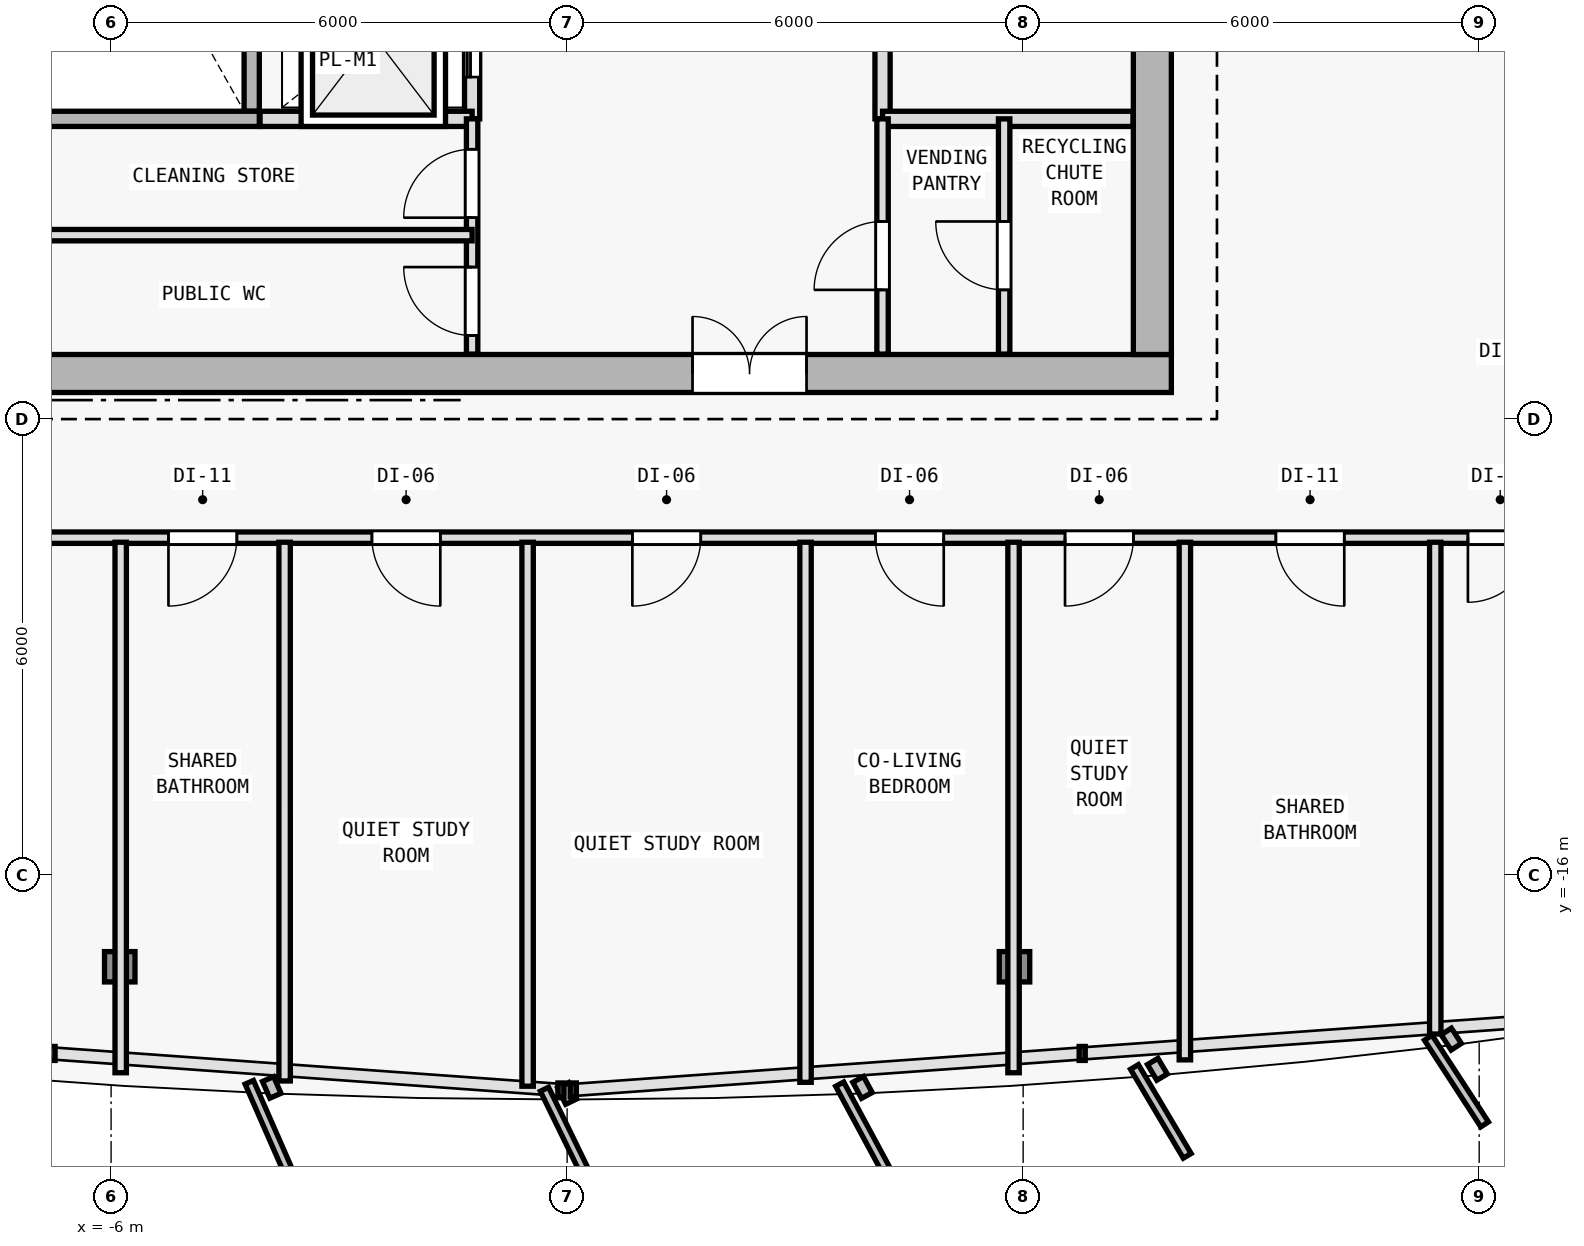
"""IFC4 building model, lengths in metres.
Left out: names, types, materials, properties, quantities, classifications, styles, units other than length and angle.
Written with IfcOpenShell. Run it as: python <this file> out.ifc"""

import sys

from ifc_helpers import new_model, si_unit, direction, frame, frame_2d, origin, origin_2d, place, context, subcontext, project, spatial, rectangle, i_section, extrude, element, fill, save


model = new_model("IFC4")
c1 = context("Model", 3, precision=1e-05, world=origin(), true_north=direction((0.0, 1.0)))
c2 = subcontext(c1, "Body", "Model", "MODEL_VIEW")
j1 = project(units=[si_unit("LENGTHUNIT", "METRE"), si_unit("PLANEANGLEUNIT", "RADIAN")], contexts=[c1])
p1 = place(None, origin())
s1 = spatial("IfcSite", under=j1, at=p1, CompositionType="ELEMENT")
p2 = place(p1, origin())
s2 = spatial("IfcBuilding", under=s1, at=p2, CompositionType="ELEMENT")
p3 = place(p2, frame((0.0, 0.0, 167.4)))
s3 = spatial("IfcBuildingStorey", under=s2, at=p3, CompositionType="ELEMENT", Elevation=167.4)
for number, where, z_axis, x_axis in (
    (1, (7.7, -9.4, 0.0), (0.0, 0.0, 1.0), (1.0, 0.0, 0.0)),
    (2, (0.0, -9.4, 0.0), (0.0, 0.0, 1.0), (1.0, 0.0, 0.0)),
):
    element("IfcColumn", number, at=place(p3, frame(where, z_axis=z_axis, x_axis=x_axis)), inside=s3, PredefinedType="COLUMN", context=c2, shape_type="SweptSolid", body=[
        extrude(i_section(OverallWidth=0.404, OverallDepth=0.407, WebThickness=0.017, FlangeThickness=0.028, FilletRadius=0.015, at=origin_2d()), origin(), (0.0, 0.0, 1.0), 3.6),
    ])
for number, where, z_axis, x_axis in (
    (3, (-5.886, -17.205, 0.006), (0.007, 0.035, 0.999), (-0.982, 0.191, 0.0)),
    (4, (5.886, -17.205, 0.006), (-0.007, 0.035, 0.999), (-0.982, -0.191, 0.0)),
):
    element("IfcColumn", number, at=place(p3, frame(where, z_axis=z_axis, x_axis=x_axis)), inside=s3, PredefinedType="COLUMN", context=c2, shape_type="SweptSolid", body=[
        extrude(i_section(OverallWidth=0.401, OverallDepth=0.399, WebThickness=0.016, FlangeThickness=0.025, FilletRadius=0.015, at=origin_2d()), origin(), (0.0, 0.0, 1.0), 3.591),
    ])
p4 = place(p3, frame((-7.95, -9.4, 0.0), z_axis=(0.0, 0.0, 1.0), x_axis=(1.0, 0.0, 0.0)))
e5 = element("IfcWall", 5, at=p4, inside=s3, PredefinedType="SHEAR", context=c2, shape_type="SweptSolid", body=[
    extrude(rectangle(XDim=15.9, YDim=0.5, at=frame_2d((7.95, 0.0))), origin(), (0.0, 0.0, 1.0), 3.35),
])
p5 = place(p4, frame((9.6, 0.0, 0.0)))
e6 = element("IfcOpeningElement", 6, at=p5, cuts=e5, PredefinedType="OPENING", context=c2, shape_type="SweptSolid", body=[
    extrude(rectangle(XDim=1.5, YDim=2.2, at=frame_2d((0.75, 1.1))), frame((0.0, 0.26, 0.0), z_axis=(0.0, -1.0, 0.0), x_axis=(1.0, 0.0, 0.0)), (0.0, 0.0, 1.0), 0.52),
])
p6 = place(p3, frame((7.7, 9.95, 0.0), z_axis=(0.0, 0.0, 1.0), x_axis=(0.0, -1.0, 0.0)))
e7 = element("IfcWall", 7, at=p6, inside=s3, PredefinedType="SHEAR", context=c2, shape_type="SweptSolid", body=[
    extrude(rectangle(XDim=19.1, YDim=0.5, at=frame_2d((9.55, 0.0))), origin(), (0.0, 0.0, 1.0), 3.35),
])
p7 = place(p3, frame((-4.15, -5.95, 0.0), z_axis=(0.0, 0.0, 1.0), x_axis=(0.0, 1.0, 0.0)))
e8 = element("IfcWall", 8, at=p7, inside=s3, PredefinedType="SOLIDWALL", context=c2, shape_type="SweptSolid", body=[
    extrude(rectangle(XDim=7.2, YDim=0.2, at=frame_2d((3.6, 0.0))), origin(), (0.0, 0.0, 1.0), 3.35),
])
p8 = place(p3, frame((4.15, -6.05, 0.0), z_axis=(0.0, 0.0, 1.0), x_axis=(0.0, 1.0, 0.0)))
e9 = element("IfcWall", 9, at=p8, inside=s3, PredefinedType="SOLIDWALL", context=c2, shape_type="SweptSolid", body=[
    extrude(rectangle(XDim=8.7, YDim=0.2, at=frame_2d((4.35, 0.0))), origin(), (0.0, 0.0, 1.0), 3.35),
])
p9 = place(p8, frame((3.6, 0.0, 0.0)))
e10 = element("IfcOpeningElement", 10, at=p9, cuts=e9, PredefinedType="OPENING", context=c2, shape_type="SweptSolid", body=[
    extrude(rectangle(XDim=0.95, YDim=2.1, at=frame_2d((0.475, 1.05))), frame((0.0, 0.11, 0.0), z_axis=(0.0, -1.0, 0.0), x_axis=(1.0, 0.0, 0.0)), (0.0, 0.0, 1.0), 0.22),
])
p10 = place(p3, frame((-1.25, -6.05, 0.0), z_axis=(0.0, 0.0, 1.0), x_axis=(0.0, 1.0, 0.0)))
e11 = element("IfcWall", 11, at=p10, inside=s3, PredefinedType="SOLIDWALL", context=c2, shape_type="SweptSolid", body=[
    extrude(rectangle(XDim=8.7, YDim=0.2, at=frame_2d((4.35, 0.0))), origin(), (0.0, 0.0, 1.0), 3.35),
])
p11 = place(p10, frame((0.55, 0.0, 0.0)))
e12 = element("IfcOpeningElement", 12, at=p11, cuts=e11, PredefinedType="OPENING", context=c2, shape_type="SweptSolid", body=[
    extrude(rectangle(XDim=1.1, YDim=2.15, at=frame_2d((0.55, 1.075))), frame((0.0, 0.11, 0.0), z_axis=(0.0, -1.0, 0.0), x_axis=(1.0, 0.0, 0.0)), (0.0, 0.0, 1.0), 0.22),
])
p12 = place(p10, frame((2.65, 0.0, 0.0)))
e13 = element("IfcOpeningElement", 13, at=p12, cuts=e11, PredefinedType="OPENING", context=c2, shape_type="SweptSolid", body=[
    extrude(rectangle(XDim=1.1, YDim=2.15, at=frame_2d((0.55, 1.075))), frame((0.0, 0.11, 0.0), z_axis=(0.0, -1.0, 0.0), x_axis=(1.0, 0.0, 0.0)), (0.0, 0.0, 1.0), 0.22),
])
p13 = place(p10, frame((4.75, 0.0, 0.0)))
e14 = element("IfcOpeningElement", 14, at=p13, cuts=e11, PredefinedType="OPENING", context=c2, shape_type="SweptSolid", body=[
    extrude(rectangle(XDim=1.1, YDim=2.15, at=frame_2d((0.55, 1.075))), frame((0.0, 0.11, 0.0), z_axis=(0.0, -1.0, 0.0), x_axis=(1.0, 0.0, 0.0)), (0.0, 0.0, 1.0), 0.22),
])
p14 = place(p10, frame((6.85, 0.0, 0.0)))
e15 = element("IfcOpeningElement", 15, at=p14, cuts=e11, PredefinedType="OPENING", context=c2, shape_type="SweptSolid", body=[
    extrude(rectangle(XDim=1.1, YDim=2.15, at=frame_2d((0.55, 1.075))), frame((0.0, 0.11, 0.0), z_axis=(0.0, -1.0, 0.0), x_axis=(1.0, 0.0, 0.0)), (0.0, 0.0, 1.0), 0.22),
])
p15 = place(p3, frame((-7.45, -6.05, 0.0), z_axis=(0.0, 0.0, 1.0), x_axis=(1.0, 0.0, 0.0)))
e16 = element("IfcWall", 16, at=p15, inside=s3, PredefinedType="SOLIDWALL", context=c2, shape_type="SweptSolid", body=[
    extrude(rectangle(XDim=3.4, YDim=0.2, at=frame_2d((1.7, 0.0))), origin(), (0.0, 0.0, 1.0), 3.35),
])
p16 = place(p3, frame((-4.04, -6.05, 0.0), z_axis=(0.0, 0.0, 1.0), x_axis=(1.0, 0.0, 0.0)))
e17 = element("IfcWall", 17, at=p16, inside=s3, PredefinedType="SOLIDWALL", context=c2, shape_type="SweptSolid", body=[
    extrude(rectangle(XDim=2.79, YDim=0.2, at=frame_2d((1.395, 0.0))), origin(), (0.0, 0.0, 1.0), 3.35),
])
p17 = place(p3, frame((4.15, -6.05, 0.0), z_axis=(0.0, 0.0, 1.0), x_axis=(1.0, 0.0, 0.0)))
e18 = element("IfcWall", 18, at=p17, inside=s3, PredefinedType="SOLIDWALL", context=c2, shape_type="SweptSolid", body=[
    extrude(rectangle(XDim=3.295, YDim=0.2, at=frame_2d((1.647, 0.0))), origin(), (0.0, 0.0, 1.0), 3.35),
])
p18 = place(p3, frame((-1.25, -9.145, 0.0), z_axis=(0.0, 0.0, 1.0), x_axis=(0.0, 1.0, 0.0)))
e19 = element("IfcWall", 19, at=p18, inside=s3, PredefinedType="PARTITIONING", context=c2, shape_type="SweptSolid", body=[
    extrude(rectangle(XDim=3.095, YDim=0.15, at=frame_2d((1.547, 0.0))), origin(), (0.0, 0.0, 1.0), 3.35),
])
p19 = place(p18, frame((1.795, 0.0, 0.0)))
e20 = element("IfcOpeningElement", 20, at=p19, cuts=e19, PredefinedType="OPENING", context=c2, shape_type="SweptSolid", body=[
    extrude(rectangle(XDim=0.9, YDim=2.1, at=frame_2d((0.45, 1.05))), frame((0.0, 0.085, 0.0), z_axis=(0.0, -1.0, 0.0), x_axis=(1.0, 0.0, 0.0)), (0.0, 0.0, 1.0), 0.17),
])
p20 = place(p18, frame((0.245, 0.0, 0.0)))
e21 = element("IfcOpeningElement", 21, at=p20, cuts=e19, PredefinedType="OPENING", context=c2, shape_type="SweptSolid", body=[
    extrude(rectangle(XDim=0.9, YDim=2.1, at=frame_2d((0.45, 1.05))), frame((0.0, 0.085, 0.0), z_axis=(0.0, -1.0, 0.0), x_axis=(1.0, 0.0, 0.0)), (0.0, 0.0, 1.0), 0.17),
])
p21 = place(p3, frame((4.15, -9.145, 0.0), z_axis=(0.0, 0.0, 1.0), x_axis=(0.0, 1.0, 0.0)))
e22 = element("IfcWall", 22, at=p21, inside=s3, PredefinedType="PARTITIONING", context=c2, shape_type="SweptSolid", body=[
    extrude(rectangle(XDim=3.095, YDim=0.15, at=frame_2d((1.547, 0.0))), origin(), (0.0, 0.0, 1.0), 3.35),
])
p22 = place(p21, frame((0.845, 0.0, 0.0)))
e23 = element("IfcOpeningElement", 23, at=p22, cuts=e22, PredefinedType="OPENING", context=c2, shape_type="SweptSolid", body=[
    extrude(rectangle(XDim=0.9, YDim=2.1, at=frame_2d((0.45, 1.05))), frame((0.0, 0.085, 0.0), z_axis=(0.0, -1.0, 0.0), x_axis=(1.0, 0.0, 0.0)), (0.0, 0.0, 1.0), 0.17),
])
p23 = place(p3, frame((-7.445, -7.58, 0.0), z_axis=(0.0, 0.0, 1.0), x_axis=(1.0, 0.0, 0.0)))
e24 = element("IfcWall", 24, at=p23, inside=s3, PredefinedType="PARTITIONING", context=c2, shape_type="SweptSolid", body=[
    extrude(rectangle(XDim=6.195, YDim=0.15, at=frame_2d((3.098, 0.0))), origin(), (0.0, 0.0, 1.0), 3.35),
])
p24 = place(p3, frame((5.75, -9.145, 0.0), z_axis=(0.0, 0.0, 1.0), x_axis=(0.0, 1.0, 0.0)))
e25 = element("IfcWall", 25, at=p24, inside=s3, PredefinedType="PARTITIONING", context=c2, shape_type="SweptSolid", body=[
    extrude(rectangle(XDim=3.095, YDim=0.15, at=frame_2d((1.547, 0.0))), origin(), (0.0, 0.0, 1.0), 3.35),
])
p25 = place(p24, frame((0.845, 0.0, 0.0)))
e26 = element("IfcOpeningElement", 26, at=p25, cuts=e25, PredefinedType="OPENING", context=c2, shape_type="SweptSolid", body=[
    extrude(rectangle(XDim=0.9, YDim=2.1, at=frame_2d((0.45, 1.05))), frame((0.0, 0.085, 0.0), z_axis=(0.0, -1.0, 0.0), x_axis=(1.0, 0.0, 0.0)), (0.0, 0.0, 1.0), 0.17),
])
p26 = place(p3, frame((13.18, -11.56, 0.0), z_axis=(0.0, 0.0, 1.0), x_axis=(-1.0, 0.0, 0.0)))
e27 = element("IfcWall", 27, at=p26, inside=s3, PredefinedType="PARTITIONING", context=c2, shape_type="SweptSolid", body=[
    extrude(rectangle(XDim=23.04, YDim=0.15, at=frame_2d((11.52, 0.0))), origin(), (0.0, 0.0, 1.0), 2.775),
])
p27 = place(p26, frame((20.508, 0.0, 0.0)))
e28 = element("IfcOpeningElement", 28, at=p27, cuts=e27, PredefinedType="OPENING", context=c2, shape_type="SweptSolid", body=[
    extrude(rectangle(XDim=0.9, YDim=2.1, at=frame_2d((0.45, 1.05))), frame((0.0, 0.085, 0.0), z_axis=(0.0, -1.0, 0.0), x_axis=(1.0, 0.0, 0.0)), (0.0, 0.0, 1.0), 0.17),
])
p28 = place(p26, frame((17.525, 0.0, 0.0)))
e29 = element("IfcOpeningElement", 29, at=p28, cuts=e27, PredefinedType="OPENING", context=c2, shape_type="SweptSolid", body=[
    extrude(rectangle(XDim=0.9, YDim=2.1, at=frame_2d((0.45, 1.05))), frame((0.0, 0.085, 0.0), z_axis=(0.0, -1.0, 0.0), x_axis=(1.0, 0.0, 0.0)), (0.0, 0.0, 1.0), 0.17),
])
p29 = place(p26, frame((14.848, 0.0, 0.0)))
e30 = element("IfcOpeningElement", 30, at=p29, cuts=e27, PredefinedType="OPENING", context=c2, shape_type="SweptSolid", body=[
    extrude(rectangle(XDim=0.9, YDim=2.1, at=frame_2d((0.45, 1.05))), frame((0.0, 0.085, 0.0), z_axis=(0.0, -1.0, 0.0), x_axis=(1.0, 0.0, 0.0)), (0.0, 0.0, 1.0), 0.17),
])
p30 = place(p26, frame((11.422, 0.0, 0.0)))
e31 = element("IfcOpeningElement", 31, at=p30, cuts=e27, PredefinedType="OPENING", context=c2, shape_type="SweptSolid", body=[
    extrude(rectangle(XDim=0.9, YDim=2.1, at=frame_2d((0.45, 1.05))), frame((0.0, 0.085, 0.0), z_axis=(0.0, -1.0, 0.0), x_axis=(1.0, 0.0, 0.0)), (0.0, 0.0, 1.0), 0.17),
])
p31 = place(p26, frame((8.225, 0.0, 0.0)))
e32 = element("IfcOpeningElement", 32, at=p31, cuts=e27, PredefinedType="OPENING", context=c2, shape_type="SweptSolid", body=[
    extrude(rectangle(XDim=0.9, YDim=2.1, at=frame_2d((0.45, 1.05))), frame((0.0, 0.085, 0.0), z_axis=(0.0, -1.0, 0.0), x_axis=(1.0, 0.0, 0.0)), (0.0, 0.0, 1.0), 0.17),
])
p32 = place(p26, frame((5.729, 0.0, 0.0)))
e33 = element("IfcOpeningElement", 33, at=p32, cuts=e27, PredefinedType="OPENING", context=c2, shape_type="SweptSolid", body=[
    extrude(rectangle(XDim=0.9, YDim=2.1, at=frame_2d((0.45, 1.05))), frame((0.0, 0.085, 0.0), z_axis=(0.0, -1.0, 0.0), x_axis=(1.0, 0.0, 0.0)), (0.0, 0.0, 1.0), 0.17),
])
p33 = place(p26, frame((2.955, 0.0, 0.0)))
e34 = element("IfcOpeningElement", 34, at=p33, cuts=e27, PredefinedType="OPENING", context=c2, shape_type="SweptSolid", body=[
    extrude(rectangle(XDim=0.9, YDim=2.1, at=frame_2d((0.45, 1.05))), frame((0.0, 0.085, 0.0), z_axis=(0.0, -1.0, 0.0), x_axis=(1.0, 0.0, 0.0)), (0.0, 0.0, 1.0), 0.17),
])
p34 = place(p26, frame((0.478, 0.0, 0.0)))
e35 = element("IfcOpeningElement", 35, at=p34, cuts=e27, PredefinedType="OPENING", context=c2, shape_type="SweptSolid", body=[
    extrude(rectangle(XDim=0.85, YDim=2.1, at=frame_2d((0.425, 1.05))), frame((0.0, 0.085, 0.0), z_axis=(0.0, -1.0, 0.0), x_axis=(1.0, 0.0, 0.0)), (0.0, 0.0, 1.0), 0.17),
])
p35 = place(p3, frame((-5.874, -11.62, 0.0), z_axis=(0.0, 0.0, 1.0), x_axis=(0.0, -1.0, 0.0)))
e36 = element("IfcWall", 36, at=p35, inside=s3, PredefinedType="PARTITIONING", context=c2, shape_type="SweptSolid", body=[
    extrude(rectangle(XDim=6.979, YDim=0.15, at=frame_2d((3.49, 0.0))), origin(), (0.0, 0.0, 1.0), 2.725),
])
p36 = place(p3, frame((5.874, -11.62, 0.0), z_axis=(0.0, 0.0, 1.0), x_axis=(0.0, -1.0, 0.0)))
e37 = element("IfcWall", 37, at=p36, inside=s3, PredefinedType="PARTITIONING", context=c2, shape_type="SweptSolid", body=[
    extrude(rectangle(XDim=6.979, YDim=0.15, at=frame_2d((3.49, 0.0))), origin(), (0.0, 0.0, 1.0), 2.775),
])
p37 = place(p3, frame((-0.52, -11.62, 0.0), z_axis=(0.0, 0.0, 1.0), x_axis=(0.0, -1.0, 0.0)))
e38 = element("IfcWall", 38, at=p37, inside=s3, PredefinedType="PARTITIONING", context=c2, shape_type="SweptSolid", body=[
    extrude(rectangle(XDim=7.156, YDim=0.15, at=frame_2d((3.578, 0.0))), origin(), (0.0, 0.0, 1.0), 2.825),
])
p38 = place(p3, frame((11.422, -11.62, 0.0), z_axis=(0.0, 0.0, 1.0), x_axis=(0.0, -1.0, 0.0)))
e39 = element("IfcWall", 39, at=p38, inside=s3, PredefinedType="PARTITIONING", context=c2, shape_type="SweptSolid", body=[
    extrude(rectangle(XDim=6.47, YDim=0.15, at=frame_2d((3.235, 0.0))), origin(), (0.0, 0.0, 1.0), 2.825),
])
p39 = place(p3, frame((-3.717, -11.62, 0.0), z_axis=(0.0, 0.0, 1.0), x_axis=(0.0, -1.0, 0.0)))
e40 = element("IfcWall", 40, at=p39, inside=s3, PredefinedType="PARTITIONING", context=c2, shape_type="SweptSolid", body=[
    extrude(rectangle(XDim=7.087, YDim=0.15, at=frame_2d((3.544, 0.0))), origin(), (0.0, 0.0, 1.0), 2.725),
])
p40 = place(p3, frame((3.137, -11.62, 0.0), z_axis=(0.0, 0.0, 1.0), x_axis=(3.4360719e-05, -0.99999999941, 0.0)))
e41 = element("IfcWall", 41, at=p40, inside=s3, PredefinedType="PARTITIONING", context=c2, shape_type="SweptSolid", body=[
    extrude(rectangle(XDim=7.105, YDim=0.15, at=frame_2d((3.553, 0.0))), origin(), (0.0, 0.0, 1.0), 2.825),
])
p41 = place(p3, frame((8.128, -11.62, 0.0), z_axis=(0.0, 0.0, 1.0), x_axis=(0.0, -1.0, 0.0)))
e42 = element("IfcWall", 42, at=p41, inside=s3, PredefinedType="PARTITIONING", context=c2, shape_type="SweptSolid", body=[
    extrude(rectangle(XDim=6.81, YDim=0.15, at=frame_2d((3.405, 0.0))), origin(), (0.0, 0.0, 1.0), 2.875),
])
p42 = place(p5, origin())
e43 = element("IfcDoor", 43, at=p42, inside=s3, OperationType="DOUBLE_DOOR_SINGLE_SWING", PredefinedType="DOOR", context=c2, shape_type="SweptSolid", body=[
    extrude(rectangle(XDim=1.5, YDim=2.2, at=frame_2d((0.75, 1.1))), frame((0.0, 0.025, 0.0), z_axis=(0.0, -1.0, 0.0), x_axis=(1.0, 0.0, 0.0)), (0.0, 0.0, 1.0), 0.05),
])
fill(e6, e43)
p43 = place(p11, origin())
e44 = element("IfcDoor", 44, at=p43, inside=s3, OperationType="DOUBLE_DOOR_SLIDING", PredefinedType="DOOR", context=c2, shape_type="SweptSolid", body=[
    extrude(rectangle(XDim=1.1, YDim=2.15, at=frame_2d((0.55, 1.075))), frame((0.0, 0.025, 0.0), z_axis=(0.0, -1.0, 0.0), x_axis=(1.0, 0.0, 0.0)), (0.0, 0.0, 1.0), 0.05),
])
fill(e12, e44)
p44 = place(p19, origin())
e45 = element("IfcDoor", 45, at=p44, inside=s3, OperationType="SINGLE_SWING_LEFT", PredefinedType="DOOR", context=c2, shape_type="SweptSolid", body=[
    extrude(rectangle(XDim=0.9, YDim=2.1, at=frame_2d((0.45, 1.05))), frame((0.0, 0.025, 0.0), z_axis=(0.0, -1.0, 0.0), x_axis=(1.0, 0.0, 0.0)), (0.0, 0.0, 1.0), 0.05),
])
fill(e20, e45)
p45 = place(p20, origin())
e46 = element("IfcDoor", 46, at=p45, inside=s3, OperationType="SINGLE_SWING_RIGHT", PredefinedType="DOOR", context=c2, shape_type="SweptSolid", body=[
    extrude(rectangle(XDim=0.9, YDim=2.1, at=frame_2d((0.45, 1.05))), frame((0.0, 0.025, 0.0), z_axis=(0.0, -1.0, 0.0), x_axis=(1.0, 0.0, 0.0)), (0.0, 0.0, 1.0), 0.05),
])
fill(e21, e46)
p46 = place(p22, origin())
e47 = element("IfcDoor", 47, at=p46, inside=s3, OperationType="SINGLE_SWING_LEFT", PredefinedType="DOOR", context=c2, shape_type="SweptSolid", body=[
    extrude(rectangle(XDim=0.9, YDim=2.1, at=frame_2d((0.45, 1.05))), frame((0.0, 0.025, 0.0), z_axis=(0.0, -1.0, 0.0), x_axis=(1.0, 0.0, 0.0)), (0.0, 0.0, 1.0), 0.05),
])
fill(e23, e47)
p47 = place(p25, origin())
e48 = element("IfcDoor", 48, at=p47, inside=s3, OperationType="SINGLE_SWING_RIGHT", PredefinedType="DOOR", context=c2, shape_type="SweptSolid", body=[
    extrude(rectangle(XDim=0.9, YDim=2.1, at=frame_2d((0.45, 1.05))), frame((0.0, 0.025, 0.0), z_axis=(0.0, -1.0, 0.0), x_axis=(1.0, 0.0, 0.0)), (0.0, 0.0, 1.0), 0.05),
])
fill(e26, e48)
p48 = place(p28, origin())
e49 = element("IfcDoor", 49, at=p48, inside=s3, OperationType="SINGLE_SWING_RIGHT", PredefinedType="DOOR", context=c2, shape_type="SweptSolid", body=[
    extrude(rectangle(XDim=0.9, YDim=2.1, at=frame_2d((0.45, 1.05))), frame((0.0, 0.025, 0.0), z_axis=(0.0, -1.0, 0.0), x_axis=(1.0, 0.0, 0.0)), (0.0, 0.0, 1.0), 0.05),
])
fill(e29, e49)
p49 = place(p29, origin())
e50 = element("IfcDoor", 50, at=p49, inside=s3, OperationType="SINGLE_SWING_LEFT", PredefinedType="DOOR", context=c2, shape_type="SweptSolid", body=[
    extrude(rectangle(XDim=0.9, YDim=2.1, at=frame_2d((0.45, 1.05))), frame((0.0, 0.025, 0.0), z_axis=(0.0, -1.0, 0.0), x_axis=(1.0, 0.0, 0.0)), (0.0, 0.0, 1.0), 0.05),
])
fill(e30, e50)
p50 = place(p30, origin())
e51 = element("IfcDoor", 51, at=p50, inside=s3, OperationType="SINGLE_SWING_RIGHT", PredefinedType="DOOR", context=c2, shape_type="SweptSolid", body=[
    extrude(rectangle(XDim=0.9, YDim=2.1, at=frame_2d((0.45, 1.05))), frame((0.0, 0.025, 0.0), z_axis=(0.0, -1.0, 0.0), x_axis=(1.0, 0.0, 0.0)), (0.0, 0.0, 1.0), 0.05),
])
fill(e31, e51)
p51 = place(p31, origin())
e52 = element("IfcDoor", 52, at=p51, inside=s3, OperationType="SINGLE_SWING_LEFT", PredefinedType="DOOR", context=c2, shape_type="SweptSolid", body=[
    extrude(rectangle(XDim=0.9, YDim=2.1, at=frame_2d((0.45, 1.05))), frame((0.0, 0.025, 0.0), z_axis=(0.0, -1.0, 0.0), x_axis=(1.0, 0.0, 0.0)), (0.0, 0.0, 1.0), 0.05),
])
fill(e32, e52)
p52 = place(p32, origin())
e53 = element("IfcDoor", 53, at=p52, inside=s3, OperationType="SINGLE_SWING_RIGHT", PredefinedType="DOOR", context=c2, shape_type="SweptSolid", body=[
    extrude(rectangle(XDim=0.9, YDim=2.1, at=frame_2d((0.45, 1.05))), frame((0.0, 0.025, 0.0), z_axis=(0.0, -1.0, 0.0), x_axis=(1.0, 0.0, 0.0)), (0.0, 0.0, 1.0), 0.05),
])
fill(e33, e53)
p53 = place(p33, origin())
e54 = element("IfcDoor", 54, at=p53, inside=s3, OperationType="SINGLE_SWING_LEFT", PredefinedType="DOOR", context=c2, shape_type="SweptSolid", body=[
    extrude(rectangle(XDim=0.9, YDim=2.1, at=frame_2d((0.45, 1.05))), frame((0.0, 0.025, 0.0), z_axis=(0.0, -1.0, 0.0), x_axis=(1.0, 0.0, 0.0)), (0.0, 0.0, 1.0), 0.05),
])
fill(e34, e54)
p54 = place(p34, origin())
e55 = element("IfcDoor", 55, at=p54, inside=s3, OperationType="SINGLE_SWING_RIGHT", PredefinedType="DOOR", context=c2, shape_type="SweptSolid", body=[
    extrude(rectangle(XDim=0.85, YDim=2.1, at=frame_2d((0.425, 1.05))), frame((0.0, 0.025, 0.0), z_axis=(0.0, -1.0, 0.0), x_axis=(1.0, 0.0, 0.0)), (0.0, 0.0, 1.0), 0.05),
])
fill(e35, e55)
save(model, sys.argv[1])
